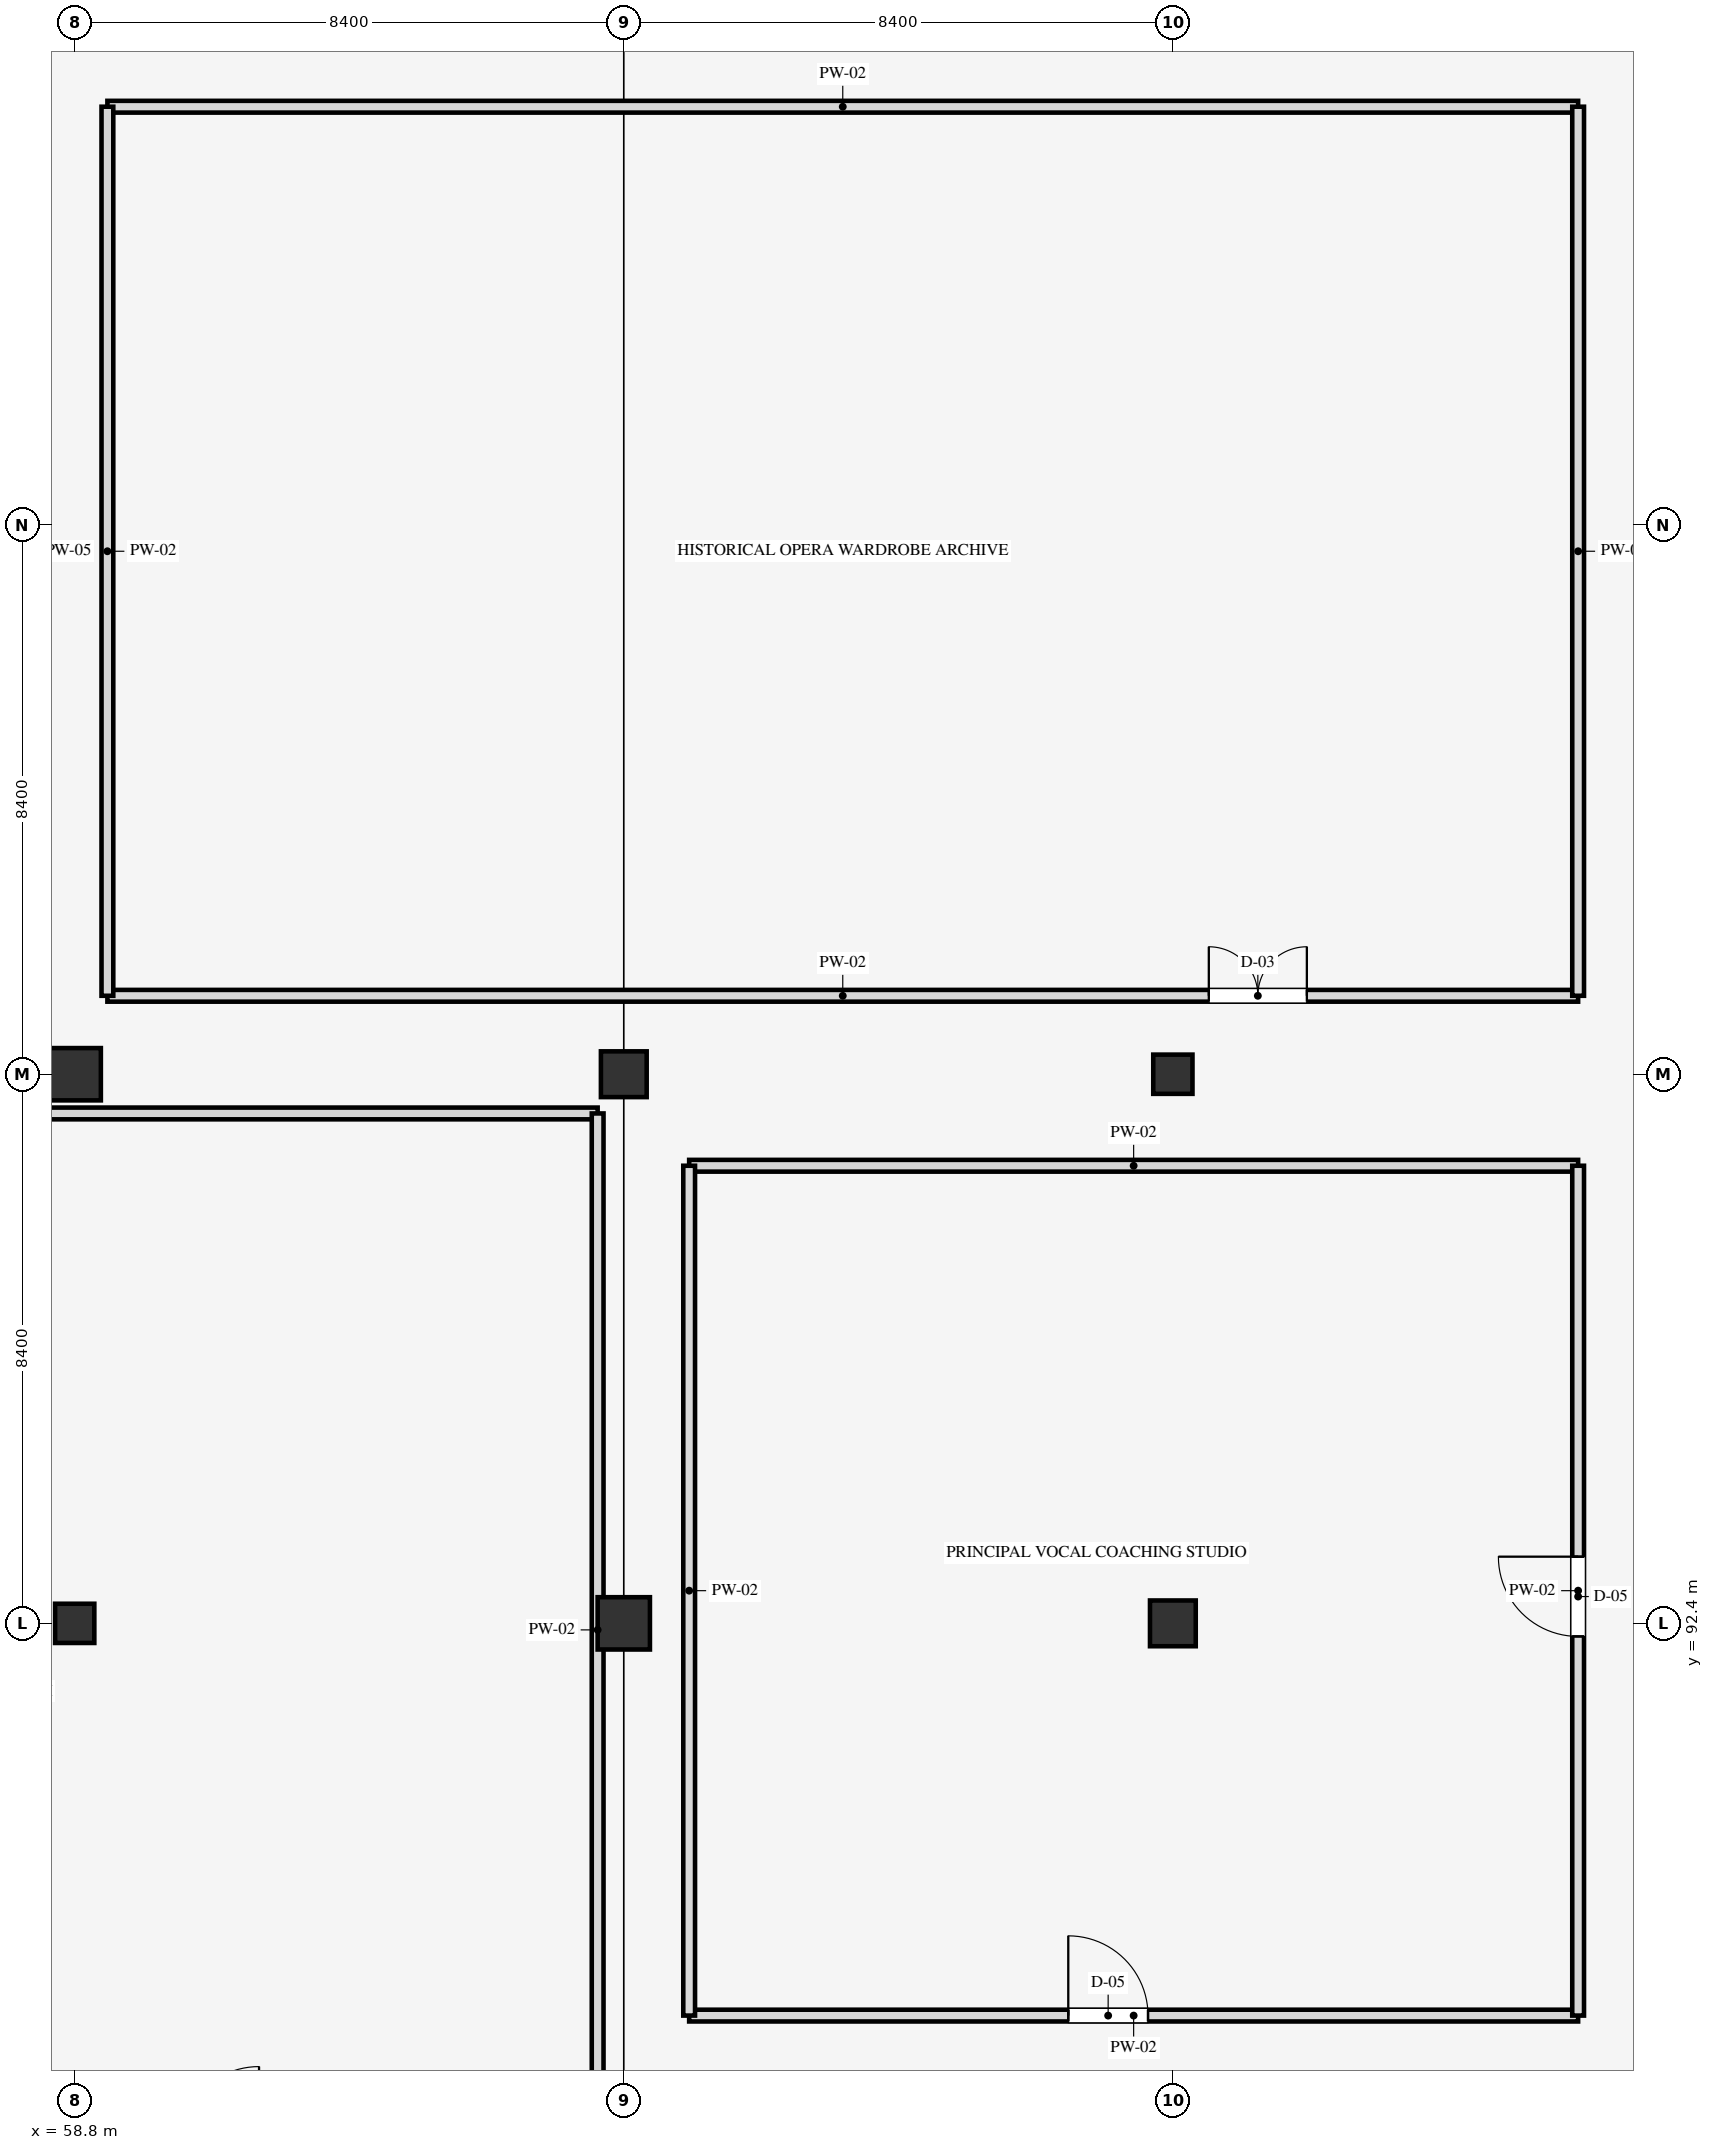
"""IFC4 building model, lengths in metres.
Left out: names, types, materials, properties, quantities, classifications, styles, units other than length and angle.
Written with IfcOpenShell. Run it as: python <this file> out.ifc"""

import sys

from ifc_helpers import new_model, si_unit, direction, frame, frame_2d, origin, origin_2d, place, context, subcontext, project, spatial, rectangle, extrude, element, fill, save


model = new_model("IFC4")
c1 = context("Model", 3, precision=1e-05, world=origin(), true_north=direction((0.0, 1.0)))
c2 = subcontext(c1, "Body", "Model", "MODEL_VIEW")
j1 = project(units=[si_unit("LENGTHUNIT", "METRE"), si_unit("PLANEANGLEUNIT", "RADIAN")], contexts=[c1])
p1 = place(None, origin())
s1 = spatial("IfcSite", under=j1, at=p1, CompositionType="ELEMENT")
p2 = place(p1, origin())
s2 = spatial("IfcBuilding", under=s1, at=p2, CompositionType="ELEMENT")
p3 = place(p2, frame((0.0, 0.0, 5.4)))
s3 = spatial("IfcBuildingStorey", under=s2, at=p3, CompositionType="ELEMENT", Elevation=5.4)
p4 = place(p3, frame((58.8, 92.4, 0.0), z_axis=(0.0, 0.0, 1.0), x_axis=(1.0, 0.0, 0.0)))
e1 = element("IfcColumn", 1, at=p4, inside=s3, PredefinedType="COLUMN", context=c2, shape_type="SweptSolid", body=[
    extrude(rectangle(XDim=0.6, YDim=0.6, at=origin_2d()), origin(), (0.0, 0.0, 1.0), 4.5),
])
for number, where, z_axis, x_axis in (
    (2, (58.8, 100.8, 0.0), (0.0, 0.0, 1.0), (1.0, 0.0, 0.0)),
    (3, (67.2, 92.4, 0.0), (0.0, 0.0, 1.0), (1.0, 0.0, 0.0)),
):
    element("IfcColumn", number, at=place(p3, frame(where, z_axis=z_axis, x_axis=x_axis)), inside=s3, PredefinedType="COLUMN", context=c2, shape_type="SweptSolid", body=[
        extrude(rectangle(XDim=0.8, YDim=0.8, at=origin_2d()), origin(), (0.0, 0.0, 1.0), 4.5),
    ])
for number, where, z_axis, x_axis in (
    (4, (67.2, 100.8, 0.0), (0.0, 0.0, 1.0), (1.0, 0.0, 0.0)),
    (5, (75.6, 92.4, 0.0), (0.0, 0.0, 1.0), (1.0, 0.0, 0.0)),
):
    element("IfcColumn", number, at=place(p3, frame(where, z_axis=z_axis, x_axis=x_axis)), inside=s3, PredefinedType="COLUMN", context=c2, shape_type="SweptSolid", body=[
        extrude(rectangle(XDim=0.7, YDim=0.7, at=origin_2d()), origin(), (0.0, 0.0, 1.0), 4.5),
    ])
p5 = place(p3, frame((75.6, 100.8, 0.0), z_axis=(0.0, 0.0, 1.0), x_axis=(1.0, 0.0, 0.0)))
e6 = element("IfcColumn", 6, at=p5, inside=s3, PredefinedType="COLUMN", context=c2, shape_type="SweptSolid", body=[
    extrude(rectangle(XDim=0.6, YDim=0.6, at=origin_2d()), origin(), (0.0, 0.0, 1.0), 4.5),
])
p6 = place(p3, frame((42.4, 100.2, 0.0), z_axis=(0.0, 0.0, 1.0), x_axis=(1.0, 0.0, 0.0)))
e7 = element("IfcWall", 7, at=p6, inside=s3, PredefinedType="PARTITIONING", context=c2, shape_type="SweptSolid", body=[
    extrude(rectangle(XDim=24.4, YDim=0.18, at=frame_2d((12.2, 0.0))), origin(), (0.0, 0.0, 1.0), 3.54),
])
p7 = place(p3, frame((66.8, 84.4, 0.0), z_axis=(0.0, 0.0, 1.0), x_axis=(0.0, 1.0, 0.0)))
e8 = element("IfcWall", 8, at=p7, inside=s3, PredefinedType="PARTITIONING", context=c2, shape_type="SweptSolid", body=[
    extrude(rectangle(XDim=15.8, YDim=0.18, at=frame_2d((7.9, 0.0))), origin(), (0.0, 0.0, 1.0), 3.54),
])
p8 = place(p3, frame((59.3, 102.0, 0.0), z_axis=(0.0, 0.0, 1.0), x_axis=(1.0, 0.0, 0.0)))
e9 = element("IfcWall", 9, at=p8, inside=s3, PredefinedType="PARTITIONING", context=c2, shape_type="SweptSolid", body=[
    extrude(rectangle(XDim=22.5, YDim=0.18, at=frame_2d((11.25, 0.0))), origin(), (0.0, 0.0, 1.0), 3.54),
])
p9 = place(p8, frame((16.85, 0.0, 0.0)))
e10 = element("IfcOpeningElement", 10, at=p9, cuts=e9, PredefinedType="OPENING", context=c2, shape_type="SweptSolid", body=[
    extrude(rectangle(XDim=1.5, YDim=2.2, at=frame_2d((0.75, 1.1))), frame((0.0, 0.1, 0.0), z_axis=(0.0, -1.0, 0.0), x_axis=(1.0, 0.0, 0.0)), (0.0, 0.0, 1.0), 0.2),
])
p10 = place(p3, frame((59.3, 115.6, 0.0), z_axis=(0.0, 0.0, 1.0), x_axis=(1.0, 0.0, 0.0)))
e11 = element("IfcWall", 11, at=p10, inside=s3, PredefinedType="PARTITIONING", context=c2, shape_type="SweptSolid", body=[
    extrude(rectangle(XDim=22.5, YDim=0.18, at=frame_2d((11.25, 0.0))), origin(), (0.0, 0.0, 1.0), 3.54),
])
for number, where, z_axis, x_axis in (
    (12, (59.3, 102.0, 0.0), (0.0, 0.0, 1.0), (0.0, 1.0, 0.0)),
    (13, (81.8, 102.0, 0.0), (0.0, 0.0, 1.0), (0.0, 1.0, 0.0)),
):
    element("IfcWall", number, at=place(p3, frame(where, z_axis=z_axis, x_axis=x_axis)), inside=s3, PredefinedType="PARTITIONING", context=c2, shape_type="SweptSolid", body=[
        extrude(rectangle(XDim=13.6, YDim=0.18, at=frame_2d((6.8, 0.0))), origin(), (0.0, 0.0, 1.0), 3.54),
    ])
p11 = place(p3, frame((68.2, 86.4, 0.0), z_axis=(0.0, 0.0, 1.0), x_axis=(1.0, 0.0, 0.0)))
e14 = element("IfcWall", 14, at=p11, inside=s3, PredefinedType="PARTITIONING", context=c2, shape_type="SweptSolid", body=[
    extrude(rectangle(XDim=13.6, YDim=0.18, at=frame_2d((6.8, 0.0))), origin(), (0.0, 0.0, 1.0), 3.54),
])
p12 = place(p11, frame((5.8, 0.0, 0.0)))
e15 = element("IfcOpeningElement", 15, at=p12, cuts=e14, PredefinedType="OPENING", context=c2, shape_type="SweptSolid", body=[
    extrude(rectangle(XDim=1.22, YDim=2.15, at=frame_2d((0.61, 1.075))), frame((0.0, 0.1, 0.0), z_axis=(0.0, -1.0, 0.0), x_axis=(1.0, 0.0, 0.0)), (0.0, 0.0, 1.0), 0.2),
])
p13 = place(p3, frame((68.2, 99.4, 0.0), z_axis=(0.0, 0.0, 1.0), x_axis=(1.0, 0.0, 0.0)))
e16 = element("IfcWall", 16, at=p13, inside=s3, PredefinedType="PARTITIONING", context=c2, shape_type="SweptSolid", body=[
    extrude(rectangle(XDim=13.6, YDim=0.18, at=frame_2d((6.8, 0.0))), origin(), (0.0, 0.0, 1.0), 3.54),
])
p14 = place(p3, frame((68.2, 86.4, 0.0), z_axis=(0.0, 0.0, 1.0), x_axis=(0.0, 1.0, 0.0)))
e17 = element("IfcWall", 17, at=p14, inside=s3, PredefinedType="PARTITIONING", context=c2, shape_type="SweptSolid", body=[
    extrude(rectangle(XDim=13.0, YDim=0.18, at=frame_2d((6.5, 0.0))), origin(), (0.0, 0.0, 1.0), 3.54),
])
p15 = place(p3, frame((81.8, 86.4, 0.0), z_axis=(0.0, 0.0, 1.0), x_axis=(0.0, 1.0, 0.0)))
e18 = element("IfcWall", 18, at=p15, inside=s3, PredefinedType="PARTITIONING", context=c2, shape_type="SweptSolid", body=[
    extrude(rectangle(XDim=13.0, YDim=0.18, at=frame_2d((6.5, 0.0))), origin(), (0.0, 0.0, 1.0), 3.54),
])
p16 = place(p15, frame((5.8, 0.0, 0.0)))
e19 = element("IfcOpeningElement", 19, at=p16, cuts=e18, PredefinedType="OPENING", context=c2, shape_type="SweptSolid", body=[
    extrude(rectangle(XDim=1.22, YDim=2.15, at=frame_2d((0.61, 1.075))), frame((0.0, 0.1, 0.0), z_axis=(0.0, -1.0, 0.0), x_axis=(1.0, 0.0, 0.0)), (0.0, 0.0, 1.0), 0.2),
])
p17 = place(p9, origin())
e20 = element("IfcDoor", 20, at=p17, inside=s3, OperationType="DOUBLE_DOOR_SINGLE_SWING", PredefinedType="DOOR", context=c2, shape_type="SweptSolid", body=[
    extrude(rectangle(XDim=1.5, YDim=2.2, at=frame_2d((0.75, 1.1))), frame((0.0, 0.025, 0.0), z_axis=(0.0, -1.0, 0.0), x_axis=(1.0, 0.0, 0.0)), (0.0, 0.0, 1.0), 0.05),
])
fill(e10, e20)
p18 = place(p12, origin())
e21 = element("IfcDoor", 21, at=p18, inside=s3, OperationType="SINGLE_SWING_LEFT", PredefinedType="DOOR", context=c2, shape_type="SweptSolid", body=[
    extrude(rectangle(XDim=1.22, YDim=2.15, at=frame_2d((0.61, 1.075))), frame((0.0, 0.025, 0.0), z_axis=(0.0, -1.0, 0.0), x_axis=(1.0, 0.0, 0.0)), (0.0, 0.0, 1.0), 0.05),
])
fill(e15, e21)
p19 = place(p16, origin())
e22 = element("IfcDoor", 22, at=p19, inside=s3, OperationType="SINGLE_SWING_RIGHT", PredefinedType="DOOR", context=c2, shape_type="SweptSolid", body=[
    extrude(rectangle(XDim=1.22, YDim=2.15, at=frame_2d((0.61, 1.075))), frame((0.0, 0.025, 0.0), z_axis=(0.0, -1.0, 0.0), x_axis=(1.0, 0.0, 0.0)), (0.0, 0.0, 1.0), 0.05),
])
fill(e19, e22)
save(model, sys.argv[1])
